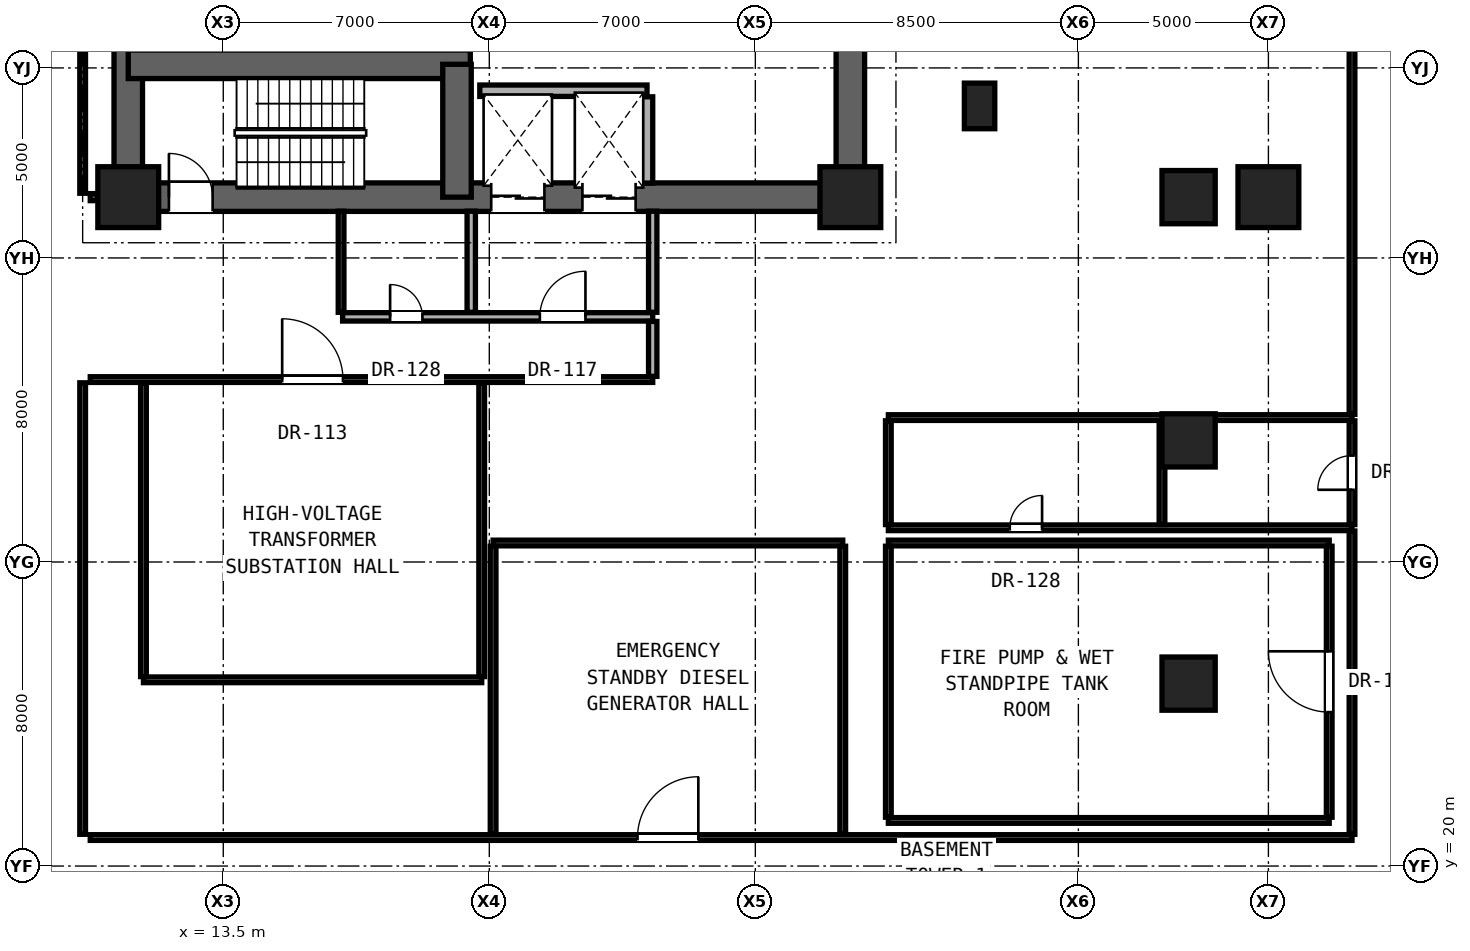
"""IFC4 building model, lengths in metres.
Left out: names, types, materials, properties, quantities, classifications, styles, units other than length and angle.
Written with IfcOpenShell. Run it as: python <this file> out.ifc"""

import sys

from ifc_helpers import new_model, si_unit, direction, frame, frame_2d, origin, origin_2d, place, context, subcontext, project, spatial, rectangle, hollow_rectangle, extrude, element, fill, save


model = new_model("IFC4")
c1 = context("Model", 3, precision=1e-05, world=origin(), true_north=direction((0.0, 1.0)))
c2 = subcontext(c1, "Body", "Model", "MODEL_VIEW")
j1 = project(units=[si_unit("LENGTHUNIT", "METRE"), si_unit("PLANEANGLEUNIT", "RADIAN")], contexts=[c1])
p1 = place(None, origin())
s1 = spatial("IfcSite", under=j1, at=p1, CompositionType="ELEMENT")
p2 = place(p1, origin())
s2 = spatial("IfcBuilding", under=s1, at=p2, CompositionType="ELEMENT")
p3 = place(p2, frame((0.0, 0.0, -4.8)))
s3 = spatial("IfcBuildingStorey", under=s2, at=p3, CompositionType="ELEMENT", Elevation=-4.8)
for number, where, z_axis, x_axis in (
    (1, (11.0, 37.6, 0.0), (0.0, 0.0, 1.0), (1.0, 0.0, 0.0)),
    (2, (30.0, 37.6, 0.0), (0.0, 0.0, 1.0), (1.0, 0.0, 0.0)),
):
    element("IfcColumn", number, at=place(p3, frame(where, z_axis=z_axis, x_axis=x_axis)), inside=s3, PredefinedType="COLUMN", context=c2, shape_type="SweptSolid", body=[
        extrude(rectangle(XDim=1.6, YDim=1.6, at=origin_2d()), origin(), (0.0, 0.0, 1.0), 4.8),
    ])
for number, where, z_axis, x_axis in (
    (3, (38.9, 24.8, 0.0), (0.0, 0.0, 1.0), (1.0, 0.0, 0.0)),
    (4, (38.9, 31.2, 0.0), (0.0, 0.0, 1.0), (1.0, 0.0, 0.0)),
    (5, (38.9, 37.6, 0.0), (0.0, 0.0, 1.0), (1.0, 0.0, 0.0)),
):
    element("IfcColumn", number, at=place(p3, frame(where, z_axis=z_axis, x_axis=x_axis)), inside=s3, PredefinedType="COLUMN", context=c2, shape_type="SweptSolid", body=[
        extrude(hollow_rectangle(XDim=1.4, YDim=1.4, WallThickness=0.08, at=origin_2d()), origin(), (0.0, 0.0, 1.0), 4.8),
    ])
p4 = place(p3, frame((33.4, 40.0, 0.0), z_axis=(0.0, 0.0, 1.0), x_axis=(1.0, 0.0, 0.0)))
e6 = element("IfcColumn", 6, at=p4, inside=s3, PredefinedType="PILASTER", context=c2, shape_type="SweptSolid", body=[
    extrude(rectangle(XDim=0.8, YDim=1.2, at=origin_2d()), origin(), (0.0, 0.0, 1.0), 4.8),
])
for number, where, z_axis, x_axis in (
    (7, (11.0, 37.6, 0.0), (0.0, 0.0, 1.0), (0.0, 1.0, 0.0)),
    (8, (30.0, 37.6, 0.0), (0.0, 0.0, 1.0), (0.0, 1.0, 0.0)),
):
    element("IfcWall", number, at=place(p3, frame(where, z_axis=z_axis, x_axis=x_axis)), inside=s3, PredefinedType="SHEAR", context=c2, shape_type="SweptSolid", body=[
        extrude(rectangle(XDim=6.0, YDim=0.75, at=frame_2d((3.0, 0.0))), origin(), (0.0, 0.0, 1.0), 4.48),
    ])
p5 = place(p3, frame((11.0, 37.6, 0.0), z_axis=(0.0, 0.0, 1.0), x_axis=(1.0, 0.0, 0.0)))
e9 = element("IfcWall", 9, at=p5, inside=s3, PredefinedType="SHEAR", context=c2, shape_type="SweptSolid", body=[
    extrude(rectangle(XDim=19.0, YDim=0.75, at=frame_2d((9.5, 0.0))), origin(), (0.0, 0.0, 1.0), 4.48),
])
p6 = place(p5, frame((1.07, 0.0, 0.0)))
e10 = element("IfcOpeningElement", 10, at=p6, cuts=e9, PredefinedType="OPENING", context=c2, shape_type="SweptSolid", body=[
    extrude(rectangle(XDim=1.15, YDim=2.2, at=frame_2d((0.575, 1.1))), frame((0.0, 0.385, 0.0), z_axis=(0.0, -1.0, 0.0), x_axis=(1.0, 0.0, 0.0)), (0.0, 0.0, 1.0), 0.77),
])
p7 = place(p5, frame((9.55, 0.0, 0.0)))
e11 = element("IfcOpeningElement", 11, at=p7, cuts=e9, PredefinedType="OPENING", context=c2, shape_type="SweptSolid", body=[
    extrude(rectangle(XDim=1.4, YDim=2.35, at=frame_2d((0.7, 1.175))), frame((0.0, 0.385, 0.0), z_axis=(0.0, -1.0, 0.0), x_axis=(1.0, 0.0, 0.0)), (0.0, 0.0, 1.0), 0.77),
])
p8 = place(p5, frame((11.95, 0.0, 0.0)))
e12 = element("IfcOpeningElement", 12, at=p8, cuts=e9, PredefinedType="OPENING", context=c2, shape_type="SweptSolid", body=[
    extrude(rectangle(XDim=1.4, YDim=2.35, at=frame_2d((0.7, 1.175))), frame((0.0, 0.385, 0.0), z_axis=(0.0, -1.0, 0.0), x_axis=(1.0, 0.0, 0.0)), (0.0, 0.0, 1.0), 0.77),
])
p9 = place(p3, frame((11.0, 41.095, 0.0), z_axis=(0.0, 0.0, 1.0), x_axis=(1.0, 0.0, 0.0)))
e13 = element("IfcWall", 13, at=p9, inside=s3, PredefinedType="SHEAR", context=c2, shape_type="SweptSolid", body=[
    extrude(rectangle(XDim=9.0, YDim=0.75, at=frame_2d((4.5, 0.0))), origin(), (0.0, 0.0, 1.0), 4.48),
])
p10 = place(p3, frame((19.65, 37.6, 0.0), z_axis=(0.0, 0.0, 1.0), x_axis=(0.0, 1.0, 0.0)))
e14 = element("IfcWall", 14, at=p10, inside=s3, PredefinedType="SHEAR", context=c2, shape_type="SweptSolid", body=[
    extrude(rectangle(XDim=3.495, YDim=0.75, at=frame_2d((1.748, 0.0))), origin(), (0.0, 0.0, 1.0), 4.48),
])
p11 = place(p3, frame((41.0, 37.6, 0.0), z_axis=(0.0, 0.0, 1.0), x_axis=(1.0, 0.0, 0.0)))
e15 = element("IfcColumn", 15, at=p11, inside=s3, PredefinedType="COLUMN", context=c2, shape_type="SweptSolid", body=[
    extrude(rectangle(XDim=1.6, YDim=1.6, at=origin_2d()), origin(), (0.0, 0.0, 1.0), 4.8),
])
p12 = place(p3, frame((10.0, 20.75, 0.0), z_axis=(0.0, 0.0, 1.0), x_axis=(1.0, 0.0, 0.0)))
e16 = element("IfcWall", 16, at=p12, inside=s3, PredefinedType="PARTITIONING", context=c2, shape_type="SweptSolid", body=[
    extrude(rectangle(XDim=33.2, YDim=0.15, at=frame_2d((16.6, 0.0))), origin(), (0.0, 0.0, 1.0), 3.252),
])
p13 = place(p12, frame((14.4, 0.0, 0.0)))
e17 = element("IfcOpeningElement", 17, at=p13, cuts=e16, PredefinedType="OPENING", context=c2, shape_type="SweptSolid", body=[
    extrude(rectangle(XDim=1.6, YDim=2.3, at=frame_2d((0.8, 1.15))), frame((0.0, 0.085, 0.0), z_axis=(0.0, -1.0, 0.0), x_axis=(1.0, 0.0, 0.0)), (0.0, 0.0, 1.0), 0.17),
])
p14 = place(p3, frame((31.0, 21.2, 0.0), z_axis=(0.0, 0.0, 1.0), x_axis=(1.0, 0.0, 0.0)))
e18 = element("IfcWall", 18, at=p14, inside=s3, PredefinedType="PARTITIONING", context=c2, shape_type="SweptSolid", body=[
    extrude(rectangle(XDim=11.6, YDim=0.15, at=frame_2d((5.8, 0.0))), origin(), (0.0, 0.0, 1.0), 3.252),
])
p15 = place(p3, frame((11.4, 24.9, 0.0), z_axis=(0.0, 0.0, 1.0), x_axis=(1.0, 0.0, 0.0)))
e19 = element("IfcWall", 19, at=p15, inside=s3, PredefinedType="PARTITIONING", context=c2, shape_type="SweptSolid", body=[
    extrude(rectangle(XDim=8.9, YDim=0.15, at=frame_2d((4.45, 0.0))), origin(), (0.0, 0.0, 1.0), 3.432),
])
p16 = place(p3, frame((20.6, 28.5, 0.0), z_axis=(0.0, 0.0, 1.0), x_axis=(1.0, 0.0, 0.0)))
e20 = element("IfcWall", 20, at=p16, inside=s3, PredefinedType="PARTITIONING", context=c2, shape_type="SweptSolid", body=[
    extrude(rectangle(XDim=9.2, YDim=0.15, at=frame_2d((4.6, 0.0))), origin(), (0.0, 0.0, 1.0), 3.432),
])
p17 = place(p3, frame((31.0, 28.5, 0.0), z_axis=(0.0, 0.0, 1.0), x_axis=(1.0, 0.0, 0.0)))
e21 = element("IfcWall", 21, at=p17, inside=s3, PredefinedType="PARTITIONING", context=c2, shape_type="SweptSolid", body=[
    extrude(rectangle(XDim=11.6, YDim=0.15, at=frame_2d((5.8, 0.0))), origin(), (0.0, 0.0, 1.0), 3.252),
])
p18 = place(p3, frame((31.0, 28.9, 0.0), z_axis=(0.0, 0.0, 1.0), x_axis=(1.0, 0.0, 0.0)))
e22 = element("IfcWall", 22, at=p18, inside=s3, PredefinedType="PARTITIONING", context=c2, shape_type="SweptSolid", body=[
    extrude(rectangle(XDim=12.2, YDim=0.15, at=frame_2d((6.1, 0.0))), origin(), (0.0, 0.0, 1.0), 3.252),
])
p19 = place(p18, frame((3.195, 0.0, 0.0)))
e23 = element("IfcOpeningElement", 23, at=p19, cuts=e22, PredefinedType="OPENING", context=c2, shape_type="SweptSolid", body=[
    extrude(rectangle(XDim=0.85, YDim=2.01, at=frame_2d((0.425, 1.005))), frame((0.0, 0.085, 0.0), z_axis=(0.0, -1.0, 0.0), x_axis=(1.0, 0.0, 0.0)), (0.0, 0.0, 1.0), 0.17),
])
p20 = place(p3, frame((31.0, 31.8, 0.0), z_axis=(0.0, 0.0, 1.0), x_axis=(1.0, 0.0, 0.0)))
e24 = element("IfcWall", 24, at=p20, inside=s3, PredefinedType="PARTITIONING", context=c2, shape_type="SweptSolid", body=[
    extrude(rectangle(XDim=12.2, YDim=0.15, at=frame_2d((6.1, 0.0))), origin(), (0.0, 0.0, 1.0), 3.252),
])
p21 = place(p3, frame((10.0, 32.8, 0.0), z_axis=(0.0, 0.0, 1.0), x_axis=(1.0, 0.0, 0.0)))
e25 = element("IfcWall", 25, at=p21, inside=s3, PredefinedType="PARTITIONING", context=c2, shape_type="SweptSolid", body=[
    extrude(rectangle(XDim=14.8, YDim=0.15, at=frame_2d((7.4, 0.0))), origin(), (0.0, 0.0, 1.0), 3.432),
])
p22 = place(p21, frame((5.05, 0.0, 0.0)))
e26 = element("IfcOpeningElement", 26, at=p22, cuts=e25, PredefinedType="OPENING", context=c2, shape_type="SweptSolid", body=[
    extrude(rectangle(XDim=1.6, YDim=2.3, at=frame_2d((0.8, 1.15))), frame((0.0, 0.085, 0.0), z_axis=(0.0, -1.0, 0.0), x_axis=(1.0, 0.0, 0.0)), (0.0, 0.0, 1.0), 0.17),
])
p23 = place(p3, frame((16.64, 34.45, 0.0), z_axis=(0.0, 0.0, 1.0), x_axis=(1.0, 0.0, 0.0)))
e27 = element("IfcWall", 27, at=p23, inside=s3, PredefinedType="SOLIDWALL", context=c2, shape_type="SweptSolid", body=[
    extrude(rectangle(XDim=8.16, YDim=0.22, at=frame_2d((4.08, 0.0))), origin(), (0.0, 0.0, 1.0), 4.009),
])
p24 = place(p23, frame((5.19, 0.0, 0.0)))
e28 = element("IfcOpeningElement", 28, at=p24, cuts=e27, PredefinedType="OPENING", context=c2, shape_type="SweptSolid", body=[
    extrude(rectangle(XDim=1.2, YDim=2.25, at=frame_2d((0.6, 1.125))), frame((0.0, 0.12, 0.0), z_axis=(0.0, -1.0, 0.0), x_axis=(1.0, 0.0, 0.0)), (0.0, 0.0, 1.0), 0.24),
])
p25 = place(p23, frame((1.25, 0.0, 0.0)))
e29 = element("IfcOpeningElement", 29, at=p25, cuts=e27, PredefinedType="OPENING", context=c2, shape_type="SweptSolid", body=[
    extrude(rectangle(XDim=0.85, YDim=2.01, at=frame_2d((0.425, 1.005))), frame((0.0, 0.12, 0.0), z_axis=(0.0, -1.0, 0.0), x_axis=(1.0, 0.0, 0.0)), (0.0, 0.0, 1.0), 0.24),
])
p26 = place(p3, frame((10.0, 37.6, 0.0), z_axis=(0.0, 0.0, 1.0), x_axis=(1.0, 0.0, 0.0)))
e30 = element("IfcWall", 30, at=p26, inside=s3, PredefinedType="SHEAR", context=c2, shape_type="SweptSolid", body=[
    extrude(rectangle(XDim=0.185, YDim=0.185, at=frame_2d((0.093, 0.0))), origin(), (0.0, 0.0, 1.0), 4.48),
])
p27 = place(p3, frame((20.25, 40.4, 0.0), z_axis=(0.0, 0.0, 1.0), x_axis=(1.0, 0.0, 0.0)))
e31 = element("IfcWall", 31, at=p27, inside=s3, PredefinedType="SOLIDWALL", context=c2, shape_type="SweptSolid", body=[
    extrude(rectangle(XDim=4.4, YDim=0.3, at=frame_2d((2.2, 0.0))), origin(), (0.0, 0.0, 1.0), 4.3),
])
p28 = place(p3, frame((9.8, 20.835, 0.0), z_axis=(0.0, 0.0, 1.0), x_axis=(0.0, 1.0, 0.0)))
e32 = element("IfcWall", 32, at=p28, inside=s3, PredefinedType="PARTITIONING", context=c2, shape_type="SweptSolid", body=[
    extrude(rectangle(XDim=11.88, YDim=0.15, at=frame_2d((5.94, 0.0))), origin(), (0.0, 0.0, 1.0), 3.699),
])
p29 = place(p3, frame((9.8, 37.702, 0.0), z_axis=(0.0, 0.0, 1.0), x_axis=(0.0, 1.0, 0.0)))
e33 = element("IfcWall", 33, at=p29, inside=s3, PredefinedType="PARTITIONING", context=c2, shape_type="SweptSolid", body=[
    extrude(rectangle(XDim=9.348, YDim=0.15, at=frame_2d((4.674, 0.0))), origin(), (0.0, 0.0, 1.0), 3.372),
])
p30 = place(p3, frame((11.4, 24.985, 0.0), z_axis=(0.0, 0.0, 1.0), x_axis=(0.0, 1.0, 0.0)))
e34 = element("IfcWall", 34, at=p30, inside=s3, PredefinedType="PARTITIONING", context=c2, shape_type="SweptSolid", body=[
    extrude(rectangle(XDim=7.73, YDim=0.15, at=frame_2d((3.865, 0.0))), origin(), (0.0, 0.0, 1.0), 3.432),
])
p31 = place(p3, frame((16.6, 34.57, 0.0), z_axis=(0.0, 0.0, 1.0), x_axis=(0.0, 1.0, 0.0)))
e35 = element("IfcWall", 35, at=p31, inside=s3, PredefinedType="PARTITIONING", context=c2, shape_type="SweptSolid", body=[
    extrude(rectangle(XDim=2.66, YDim=0.15, at=frame_2d((1.33, 0.0))), origin(), (0.0, 0.0, 1.0), 4.3),
])
p32 = place(p3, frame((20.025, 34.57, 0.0), z_axis=(0.0, 0.0, 1.0), x_axis=(0.0, 1.0, 0.0)))
e36 = element("IfcWall", 36, at=p32, inside=s3, PredefinedType="SOLIDWALL", context=c2, shape_type="SweptSolid", body=[
    extrude(rectangle(XDim=2.66, YDim=0.22, at=frame_2d((1.33, 0.0))), origin(), (0.0, 0.0, 1.0), 4.3),
])
p33 = place(p3, frame((20.3, 24.985, 0.0), z_axis=(0.0, 0.0, 1.0), x_axis=(0.0, 1.0, 0.0)))
e37 = element("IfcWall", 37, at=p33, inside=s3, PredefinedType="PARTITIONING", context=c2, shape_type="SweptSolid", body=[
    extrude(rectangle(XDim=7.73, YDim=0.15, at=frame_2d((3.865, 0.0))), origin(), (0.0, 0.0, 1.0), 3.432),
])
p34 = place(p3, frame((20.6, 20.85, 0.0), z_axis=(0.0, 0.0, 1.0), x_axis=(0.0, 1.0, 0.0)))
e38 = element("IfcWall", 38, at=p34, inside=s3, PredefinedType="PARTITIONING", context=c2, shape_type="SweptSolid", body=[
    extrude(rectangle(XDim=7.565, YDim=0.15, at=frame_2d((3.782, 0.0))), origin(), (0.0, 0.0, 1.0), 3.432),
])
p35 = place(p3, frame((24.65, 37.97, 0.0), z_axis=(0.0, 0.0, 1.0), x_axis=(0.0, 1.0, 0.0)))
e39 = element("IfcWall", 39, at=p35, inside=s3, PredefinedType="SOLIDWALL", context=c2, shape_type="SweptSolid", body=[
    extrude(rectangle(XDim=2.27, YDim=0.3, at=frame_2d((1.135, 0.0))), origin(), (0.0, 0.0, 1.0), 4.3),
])
p36 = place(p3, frame((24.8, 32.885, 0.0), z_axis=(0.0, 0.0, 1.0), x_axis=(0.0, 1.0, 0.0)))
e40 = element("IfcWall", 40, at=p36, inside=s3, PredefinedType="SOLIDWALL", context=c2, shape_type="SweptSolid", body=[
    extrude(rectangle(XDim=1.445, YDim=0.22, at=frame_2d((0.723, 0.0))), origin(), (0.0, 0.0, 1.0), 4.3),
])
p37 = place(p3, frame((24.8, 34.57, 0.0), z_axis=(0.0, 0.0, 1.0), x_axis=(0.0, 1.0, 0.0)))
e41 = element("IfcWall", 41, at=p37, inside=s3, PredefinedType="SOLIDWALL", context=c2, shape_type="SweptSolid", body=[
    extrude(rectangle(XDim=2.66, YDim=0.22, at=frame_2d((1.33, 0.0))), origin(), (0.0, 0.0, 1.0), 4.3),
])
p38 = place(p3, frame((29.8, 20.85, 0.0), z_axis=(0.0, 0.0, 1.0), x_axis=(0.0, 1.0, 0.0)))
e42 = element("IfcWall", 42, at=p38, inside=s3, PredefinedType="PARTITIONING", context=c2, shape_type="SweptSolid", body=[
    extrude(rectangle(XDim=7.565, YDim=0.15, at=frame_2d((3.782, 0.0))), origin(), (0.0, 0.0, 1.0), 3.432),
])
p39 = place(p3, frame((31.0, 21.285, 0.0), z_axis=(0.0, 0.0, 1.0), x_axis=(0.0, 1.0, 0.0)))
e43 = element("IfcWall", 43, at=p39, inside=s3, PredefinedType="PARTITIONING", context=c2, shape_type="SweptSolid", body=[
    extrude(rectangle(XDim=7.13, YDim=0.15, at=frame_2d((3.565, 0.0))), origin(), (0.0, 0.0, 1.0), 3.699),
])
for number, where, z_axis, x_axis in (
    (44, (31.0, 28.985, 0.0), (0.0, 0.0, 1.0), (0.0, 1.0, 0.0)),
    (45, (38.2, 28.985, 0.0), (0.0, 0.0, 1.0), (0.0, 1.0, 0.0)),
):
    element("IfcWall", number, at=place(p3, frame(where, z_axis=z_axis, x_axis=x_axis)), inside=s3, PredefinedType="PARTITIONING", context=c2, shape_type="SweptSolid", body=[
        extrude(rectangle(XDim=2.73, YDim=0.15, at=frame_2d((1.365, 0.0))), origin(), (0.0, 0.0, 1.0), 3.699),
    ])
p40 = place(p3, frame((42.6, 21.285, 0.0), z_axis=(0.0, 0.0, 1.0), x_axis=(0.0, 1.0, 0.0)))
e46 = element("IfcWall", 46, at=p40, inside=s3, PredefinedType="PARTITIONING", context=c2, shape_type="SweptSolid", body=[
    extrude(rectangle(XDim=7.13, YDim=0.15, at=frame_2d((3.565, 0.0))), origin(), (0.0, 0.0, 1.0), 4.3),
])
p41 = place(p40, frame((2.765, 0.0, 0.0)))
e47 = element("IfcOpeningElement", 47, at=p41, cuts=e46, PredefinedType="OPENING", context=c2, shape_type="SweptSolid", body=[
    extrude(rectangle(XDim=1.6, YDim=2.3, at=frame_2d((0.8, 1.15))), frame((0.0, 0.085, 0.0), z_axis=(0.0, -1.0, 0.0), x_axis=(1.0, 0.0, 0.0)), (0.0, 0.0, 1.0), 0.17),
])
p42 = place(p3, frame((43.2, 20.835, 0.0), z_axis=(0.0, 0.0, 1.0), x_axis=(0.0, 1.0, 0.0)))
e48 = element("IfcWall", 48, at=p42, inside=s3, PredefinedType="PARTITIONING", context=c2, shape_type="SweptSolid", body=[
    extrude(rectangle(XDim=7.98, YDim=0.15, at=frame_2d((3.99, 0.0))), origin(), (0.0, 0.0, 1.0), 4.3),
])
p43 = place(p3, frame((43.2, 28.985, 0.0), z_axis=(0.0, 0.0, 1.0), x_axis=(0.0, 1.0, 0.0)))
e49 = element("IfcWall", 49, at=p43, inside=s3, PredefinedType="PARTITIONING", context=c2, shape_type="SweptSolid", body=[
    extrude(rectangle(XDim=2.73, YDim=0.15, at=frame_2d((1.365, 0.0))), origin(), (0.0, 0.0, 1.0), 4.3),
])
p44 = place(p43, frame((0.915, 0.0, 0.0)))
e50 = element("IfcOpeningElement", 50, at=p44, cuts=e49, PredefinedType="OPENING", context=c2, shape_type="SweptSolid", body=[
    extrude(rectangle(XDim=0.9, YDim=2.1, at=frame_2d((0.45, 1.05))), frame((0.0, 0.085, 0.0), z_axis=(0.0, -1.0, 0.0), x_axis=(1.0, 0.0, 0.0)), (0.0, 0.0, 1.0), 0.17),
])
p45 = place(p3, frame((43.2, 31.885, 0.0), z_axis=(0.0, 0.0, 1.0), x_axis=(0.0, 1.0, 0.0)))
e51 = element("IfcWall", 51, at=p45, inside=s3, PredefinedType="PARTITIONING", context=c2, shape_type="SweptSolid", body=[
    extrude(rectangle(XDim=15.165, YDim=0.15, at=frame_2d((7.583, 0.0))), origin(), (0.0, 0.0, 1.0), 3.252),
])
p46 = place(p6, origin())
e52 = element("IfcDoor", 52, at=p46, inside=s3, OperationType="SINGLE_SWING_LEFT", PredefinedType="DOOR", context=c2, shape_type="SweptSolid", body=[
    extrude(rectangle(XDim=1.15, YDim=2.2, at=frame_2d((0.575, 1.1))), frame((0.0, 0.025, 0.0), z_axis=(0.0, -1.0, 0.0), x_axis=(1.0, 0.0, 0.0)), (0.0, 0.0, 1.0), 0.05),
])
fill(e10, e52)
p47 = place(p24, origin())
e53 = element("IfcDoor", 53, at=p47, inside=s3, OperationType="SINGLE_SWING_RIGHT", PredefinedType="DOOR", context=c2, shape_type="SweptSolid", body=[
    extrude(rectangle(XDim=1.2, YDim=2.25, at=frame_2d((0.6, 1.125))), frame((0.0, 0.025, 0.0), z_axis=(0.0, -1.0, 0.0), x_axis=(1.0, 0.0, 0.0)), (0.0, 0.0, 1.0), 0.05),
])
fill(e28, e53)
p48 = place(p25, origin())
e54 = element("IfcDoor", 54, at=p48, inside=s3, OperationType="SINGLE_SWING_LEFT", PredefinedType="DOOR", context=c2, shape_type="SweptSolid", body=[
    extrude(rectangle(XDim=0.85, YDim=2.01, at=frame_2d((0.425, 1.005))), frame((0.0, 0.025, 0.0), z_axis=(0.0, -1.0, 0.0), x_axis=(1.0, 0.0, 0.0)), (0.0, 0.0, 1.0), 0.05),
])
fill(e29, e54)
p49 = place(p22, origin())
e55 = element("IfcDoor", 55, at=p49, inside=s3, OperationType="SINGLE_SWING_LEFT", PredefinedType="DOOR", context=c2, shape_type="SweptSolid", body=[
    extrude(rectangle(XDim=1.6, YDim=2.3, at=frame_2d((0.8, 1.15))), frame((0.0, 0.025, 0.0), z_axis=(0.0, -1.0, 0.0), x_axis=(1.0, 0.0, 0.0)), (0.0, 0.0, 1.0), 0.05),
])
fill(e26, e55)
p50 = place(p13, origin())
e56 = element("IfcDoor", 56, at=p50, inside=s3, OperationType="SINGLE_SWING_RIGHT", PredefinedType="DOOR", context=c2, shape_type="SweptSolid", body=[
    extrude(rectangle(XDim=1.6, YDim=2.3, at=frame_2d((0.8, 1.15))), frame((0.0, 0.025, 0.0), z_axis=(0.0, -1.0, 0.0), x_axis=(1.0, 0.0, 0.0)), (0.0, 0.0, 1.0), 0.05),
])
fill(e17, e56)
p51 = place(p41, origin())
e57 = element("IfcDoor", 57, at=p51, inside=s3, OperationType="SINGLE_SWING_RIGHT", PredefinedType="DOOR", context=c2, shape_type="SweptSolid", body=[
    extrude(rectangle(XDim=1.6, YDim=2.3, at=frame_2d((0.8, 1.15))), frame((0.0, 0.025, 0.0), z_axis=(0.0, -1.0, 0.0), x_axis=(1.0, 0.0, 0.0)), (0.0, 0.0, 1.0), 0.05),
])
fill(e47, e57)
p52 = place(p19, origin())
e58 = element("IfcDoor", 58, at=p52, inside=s3, OperationType="SINGLE_SWING_RIGHT", PredefinedType="DOOR", context=c2, shape_type="SweptSolid", body=[
    extrude(rectangle(XDim=0.85, YDim=2.01, at=frame_2d((0.425, 1.005))), frame((0.0, 0.025, 0.0), z_axis=(0.0, -1.0, 0.0), x_axis=(1.0, 0.0, 0.0)), (0.0, 0.0, 1.0), 0.05),
])
fill(e23, e58)
p53 = place(p44, origin())
e59 = element("IfcDoor", 59, at=p53, inside=s3, OperationType="SINGLE_SWING_LEFT", PredefinedType="DOOR", context=c2, shape_type="SweptSolid", body=[
    extrude(rectangle(XDim=0.9, YDim=2.1, at=frame_2d((0.45, 1.05))), frame((0.0, 0.025, 0.0), z_axis=(0.0, -1.0, 0.0), x_axis=(1.0, 0.0, 0.0)), (0.0, 0.0, 1.0), 0.05),
])
fill(e50, e59)
p54 = place(p7, origin())
e60 = element("IfcDoor", 60, at=p54, inside=s3, OperationType="DOUBLE_DOOR_SLIDING", PredefinedType="DOOR", context=c2, shape_type="SweptSolid", body=[
    extrude(rectangle(XDim=1.4, YDim=2.35, at=frame_2d((0.7, 1.175))), frame((0.0, 0.025, 0.0), z_axis=(0.0, -1.0, 0.0), x_axis=(1.0, 0.0, 0.0)), (0.0, 0.0, 1.0), 0.05),
])
fill(e11, e60)
p55 = place(p8, origin())
e61 = element("IfcDoor", 61, at=p55, inside=s3, OperationType="DOUBLE_DOOR_SLIDING", PredefinedType="DOOR", context=c2, shape_type="SweptSolid", body=[
    extrude(rectangle(XDim=1.4, YDim=2.35, at=frame_2d((0.7, 1.175))), frame((0.0, 0.025, 0.0), z_axis=(0.0, -1.0, 0.0), x_axis=(1.0, 0.0, 0.0)), (0.0, 0.0, 1.0), 0.05),
])
fill(e12, e61)
save(model, sys.argv[1])
